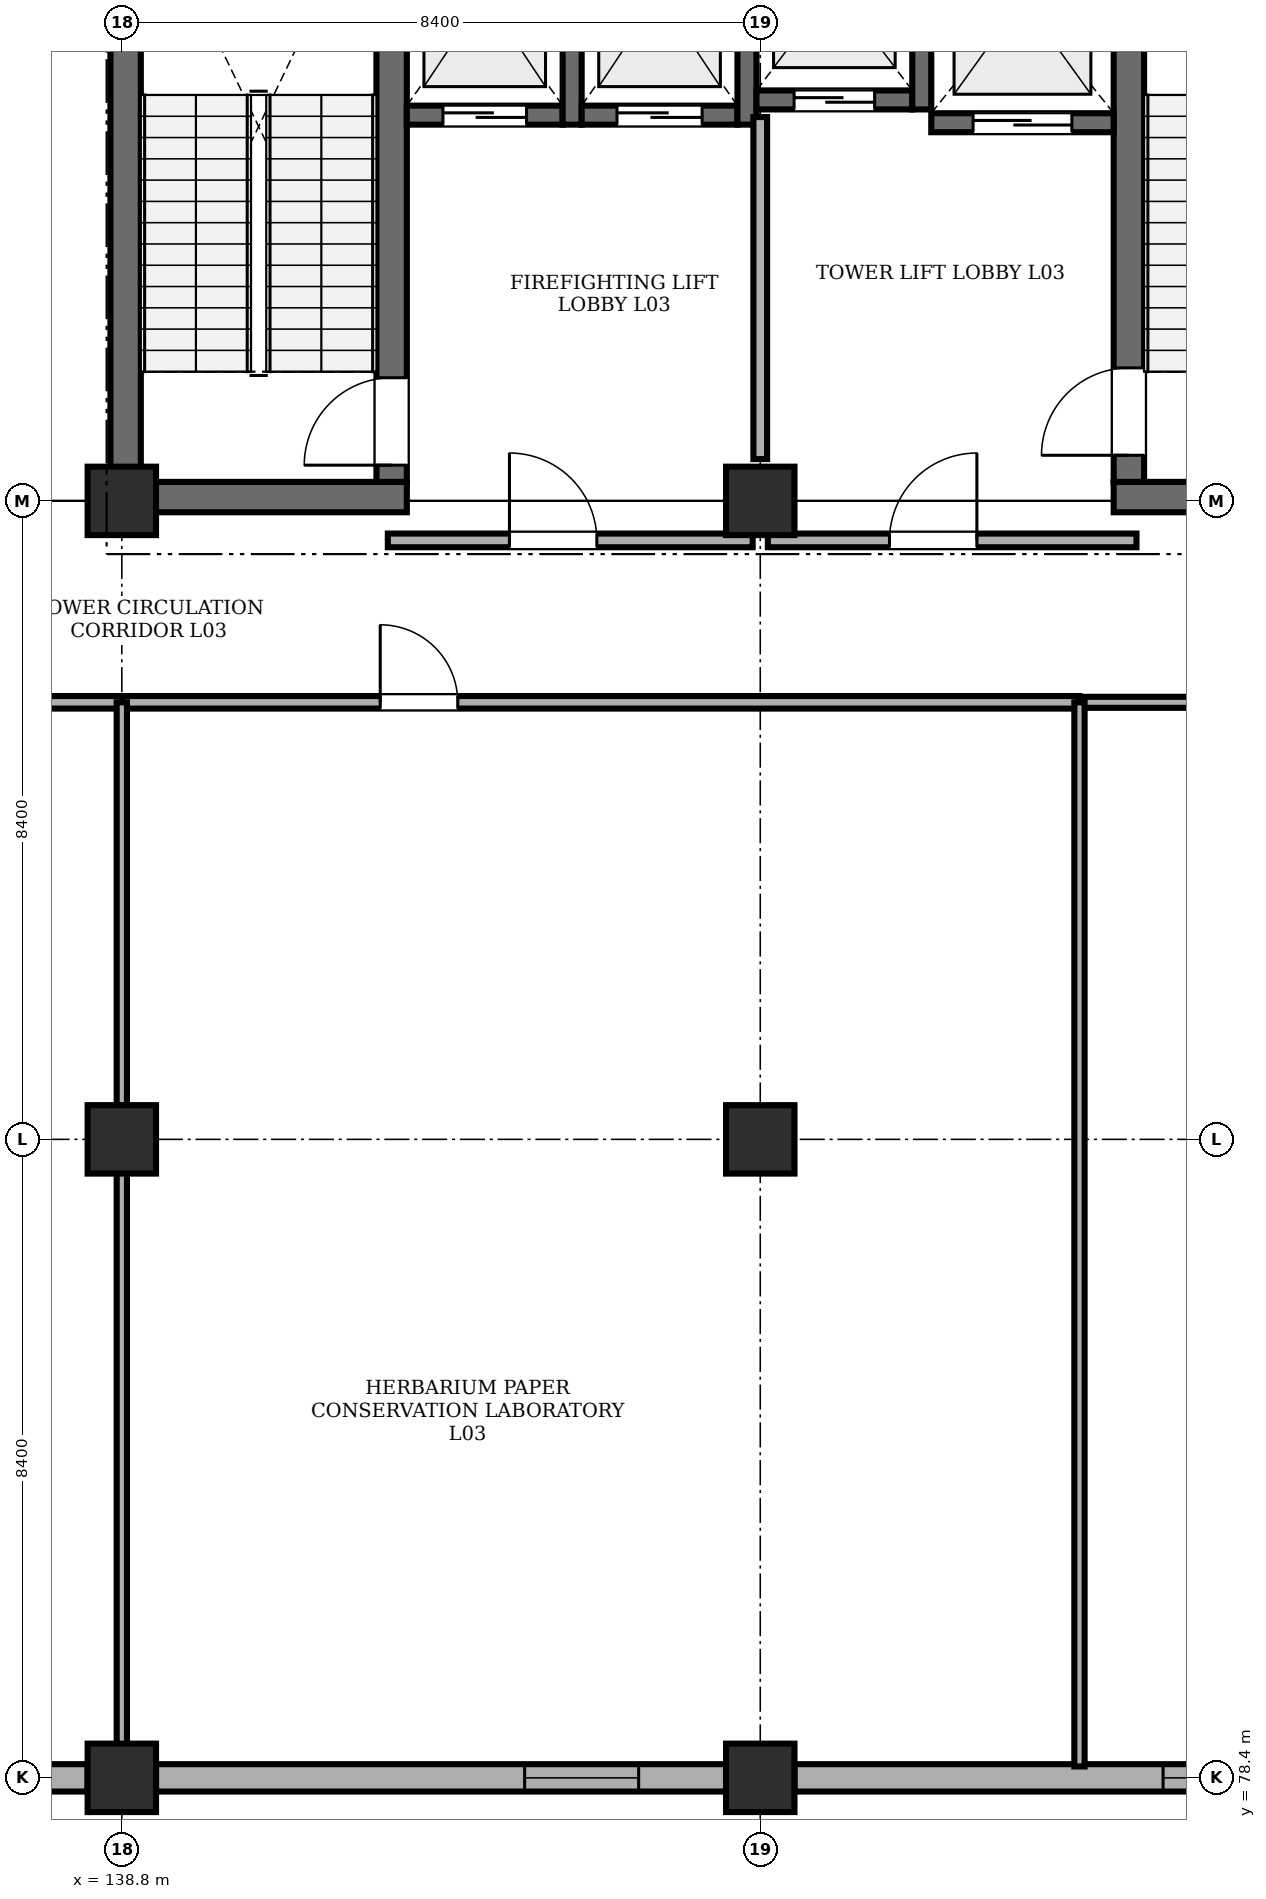
"""IFC4 building model, lengths in metres.
Left out: names, types, materials, properties, quantities, classifications, styles, units other than length and angle.
Written with IfcOpenShell. Run it as: python <this file> out.ifc"""

import sys

from ifc_helpers import new_model, si_unit, direction, frame, frame_2d, origin, origin_2d, place, context, subcontext, project, spatial, rectangle, extrude, element, fill, save


model = new_model("IFC4")
c1 = context("Model", 3, precision=1e-05, world=origin(), true_north=direction((0.0, 1.0)))
c2 = subcontext(c1, "Body", "Model", "MODEL_VIEW")
j1 = project(units=[si_unit("LENGTHUNIT", "METRE"), si_unit("PLANEANGLEUNIT", "RADIAN")], contexts=[c1])
p1 = place(None, origin())
s1 = spatial("IfcSite", under=j1, at=p1, CompositionType="ELEMENT")
p2 = place(p1, origin())
s2 = spatial("IfcBuilding", under=s1, at=p2, CompositionType="ELEMENT")
p3 = place(p2, frame((0.0, 0.0, 10.2)))
s3 = spatial("IfcBuildingStorey", under=s2, at=p3, CompositionType="ELEMENT", Elevation=10.2)
for number, where, z_axis, x_axis in (
    (1, (138.8, 78.4, 0.0), (0.0, 0.0, 1.0), (1.0, 0.0, 0.0)),
    (2, (138.8, 86.8, 0.0), (0.0, 0.0, 1.0), (1.0, 0.0, 0.0)),
    (3, (138.8, 95.2, 0.0), (0.0, 0.0, 1.0), (1.0, 0.0, 0.0)),
    (4, (147.2, 78.4, 0.0), (0.0, 0.0, 1.0), (1.0, 0.0, 0.0)),
    (5, (147.2, 86.8, 0.0), (0.0, 0.0, 1.0), (1.0, 0.0, 0.0)),
    (6, (147.2, 95.2, 0.0), (0.0, 0.0, 1.0), (1.0, 0.0, 0.0)),
):
    element("IfcColumn", number, at=place(p3, frame(where, z_axis=z_axis, x_axis=x_axis)), inside=s3, PredefinedType="COLUMN", context=c2, shape_type="SweptSolid", body=[
        extrude(rectangle(XDim=0.9, YDim=0.9, at=origin_2d()), origin(), (0.0, 0.0, 1.0), 4.26),
    ])
p4 = place(p3, frame((138.65, 95.25, 0.0), z_axis=(0.0, 0.0, 1.0), x_axis=(1.0, 0.0, 0.0)))
e7 = element("IfcWall", 7, at=p4, inside=s3, PredefinedType="SHEAR", context=c2, shape_type="SweptSolid", body=[
    extrude(rectangle(XDim=3.9, YDim=0.4, at=frame_2d((1.95, 0.0))), origin(), (0.0, 0.0, 1.0), 4.26),
])
p5 = place(p3, frame((138.85, 95.45, 0.0), z_axis=(0.0, 0.0, 1.0), x_axis=(0.0, 1.0, 0.0)))
e8 = element("IfcWall", 8, at=p5, inside=s3, PredefinedType="SHEAR", context=c2, shape_type="SweptSolid", body=[
    extrude(rectangle(XDim=7.9, YDim=0.4, at=frame_2d((3.95, 0.0))), origin(), (0.0, 0.0, 1.0), 4.26),
])
p6 = place(p3, frame((142.35, 95.45, 0.0), z_axis=(0.0, 0.0, 1.0), x_axis=(0.0, 1.0, 0.0)))
e9 = element("IfcWall", 9, at=p6, inside=s3, PredefinedType="SHEAR", context=c2, shape_type="SweptSolid", body=[
    extrude(rectangle(XDim=7.9, YDim=0.4, at=frame_2d((3.95, 0.0))), origin(), (0.0, 0.0, 1.0), 4.26),
])
p7 = place(p6, frame((0.22, 0.0, 0.0)))
e10 = element("IfcOpeningElement", 10, at=p7, cuts=e9, PredefinedType="OPENING", context=c2, shape_type="SweptSolid", body=[
    extrude(rectangle(XDim=1.15, YDim=2.15, at=frame_2d((0.575, 1.075))), frame((0.0, 0.21, 0.0), z_axis=(0.0, -1.0, 0.0), x_axis=(1.0, 0.0, 0.0)), (0.0, 0.0, 1.0), 0.42),
])
p8 = place(p3, frame((151.85, 95.25, 0.0), z_axis=(0.0, 0.0, 1.0), x_axis=(1.0, 0.0, 0.0)))
e11 = element("IfcWall", 11, at=p8, inside=s3, PredefinedType="SHEAR", context=c2, shape_type="SweptSolid", body=[
    extrude(rectangle(XDim=3.9, YDim=0.4, at=frame_2d((1.95, 0.0))), origin(), (0.0, 0.0, 1.0), 4.26),
])
p9 = place(p3, frame((152.05, 95.45, 0.0), z_axis=(0.0, 0.0, 1.0), x_axis=(0.0, 1.0, 0.0)))
e12 = element("IfcWall", 12, at=p9, inside=s3, PredefinedType="SHEAR", context=c2, shape_type="SweptSolid", body=[
    extrude(rectangle(XDim=7.9, YDim=0.4, at=frame_2d((3.95, 0.0))), origin(), (0.0, 0.0, 1.0), 4.26),
])
p10 = place(p9, frame((0.35, 0.0, 0.0)))
e13 = element("IfcOpeningElement", 13, at=p10, cuts=e12, PredefinedType="OPENING", context=c2, shape_type="SweptSolid", body=[
    extrude(rectangle(XDim=1.15, YDim=2.15, at=frame_2d((0.575, 1.075))), frame((0.0, 0.21, 0.0), z_axis=(0.0, -1.0, 0.0), x_axis=(1.0, 0.0, 0.0)), (0.0, 0.0, 1.0), 0.42),
])
p11 = place(p3, frame((142.55, 100.275, 0.0), z_axis=(0.0, 0.0, 1.0), x_axis=(1.0, 0.0, 0.0)))
e14 = element("IfcWall", 14, at=p11, inside=s3, PredefinedType="SHEAR", context=c2, shape_type="SweptSolid", body=[
    extrude(rectangle(XDim=2.05, YDim=0.25, at=frame_2d((1.025, 0.0))), origin(), (0.0, 0.0, 1.0), 4.26),
])
p12 = place(p11, frame((0.475, 0.0, 0.0)))
e15 = element("IfcOpeningElement", 15, at=p12, cuts=e14, PredefinedType="OPENING", context=c2, shape_type="SweptSolid", body=[
    extrude(rectangle(XDim=1.1, YDim=2.15, at=frame_2d((0.55, 1.075))), frame((0.0, 0.135, 0.0), z_axis=(0.0, -1.0, 0.0), x_axis=(1.0, 0.0, 0.0)), (0.0, 0.0, 1.0), 0.27),
])
p13 = place(p3, frame((144.725, 100.15, 0.0), z_axis=(0.0, 0.0, 1.0), x_axis=(0.0, 1.0, 0.0)))
e16 = element("IfcWall", 16, at=p13, inside=s3, PredefinedType="SHEAR", context=c2, shape_type="SweptSolid", body=[
    extrude(rectangle(XDim=3.4, YDim=0.25, at=frame_2d((1.7, 0.0))), origin(), (0.0, 0.0, 1.0), 4.26),
])
p14 = place(p3, frame((144.85, 100.275, 0.0), z_axis=(0.0, 0.0, 1.0), x_axis=(1.0, 0.0, 0.0)))
e17 = element("IfcWall", 17, at=p14, inside=s3, PredefinedType="SHEAR", context=c2, shape_type="SweptSolid", body=[
    extrude(rectangle(XDim=2.05, YDim=0.25, at=frame_2d((1.025, 0.0))), origin(), (0.0, 0.0, 1.0), 4.26),
])
p15 = place(p14, frame((0.465, 0.0, 0.0)))
e18 = element("IfcOpeningElement", 18, at=p15, cuts=e17, PredefinedType="OPENING", context=c2, shape_type="SweptSolid", body=[
    extrude(rectangle(XDim=1.12, YDim=2.15, at=frame_2d((0.56, 1.075))), frame((0.0, 0.135, 0.0), z_axis=(0.0, -1.0, 0.0), x_axis=(1.0, 0.0, 0.0)), (0.0, 0.0, 1.0), 0.27),
])
p16 = place(p3, frame((147.025, 100.15, 0.0), z_axis=(0.0, 0.0, 1.0), x_axis=(0.0, 1.0, 0.0)))
e19 = element("IfcWall", 19, at=p16, inside=s3, PredefinedType="SHEAR", context=c2, shape_type="SweptSolid", body=[
    extrude(rectangle(XDim=3.4, YDim=0.25, at=frame_2d((1.7, 0.0))), origin(), (0.0, 0.0, 1.0), 4.26),
])
p17 = place(p3, frame((147.15, 100.475, 0.0), z_axis=(0.0, 0.0, 1.0), x_axis=(1.0, 0.0, 0.0)))
e20 = element("IfcWall", 20, at=p17, inside=s3, PredefinedType="SHEAR", context=c2, shape_type="SweptSolid", body=[
    extrude(rectangle(XDim=2.05, YDim=0.25, at=frame_2d((1.025, 0.0))), origin(), (0.0, 0.0, 1.0), 4.26),
])
p18 = place(p17, frame((0.495, 0.0, 0.0)))
e21 = element("IfcOpeningElement", 21, at=p18, cuts=e20, PredefinedType="OPENING", context=c2, shape_type="SweptSolid", body=[
    extrude(rectangle(XDim=1.06, YDim=2.15, at=frame_2d((0.53, 1.075))), frame((0.0, 0.135, 0.0), z_axis=(0.0, -1.0, 0.0), x_axis=(1.0, 0.0, 0.0)), (0.0, 0.0, 1.0), 0.27),
])
p19 = place(p3, frame((149.325, 100.35, 0.0), z_axis=(0.0, 0.0, 1.0), x_axis=(0.0, 1.0, 0.0)))
e22 = element("IfcWall", 22, at=p19, inside=s3, PredefinedType="SHEAR", context=c2, shape_type="SweptSolid", body=[
    extrude(rectangle(XDim=3.2, YDim=0.25, at=frame_2d((1.6, 0.0))), origin(), (0.0, 0.0, 1.0), 4.26),
])
p20 = place(p3, frame((149.45, 100.175, 0.0), z_axis=(0.0, 0.0, 1.0), x_axis=(1.0, 0.0, 0.0)))
e23 = element("IfcWall", 23, at=p20, inside=s3, PredefinedType="SHEAR", context=c2, shape_type="SweptSolid", body=[
    extrude(rectangle(XDim=2.4, YDim=0.25, at=frame_2d((1.2, 0.0))), origin(), (0.0, 0.0, 1.0), 4.26),
])
p21 = place(p20, frame((0.55, 0.0, 0.0)))
e24 = element("IfcOpeningElement", 24, at=p21, cuts=e23, PredefinedType="OPENING", context=c2, shape_type="SweptSolid", body=[
    extrude(rectangle(XDim=1.3, YDim=2.25, at=frame_2d((0.65, 1.125))), frame((0.0, 0.135, 0.0), z_axis=(0.0, -1.0, 0.0), x_axis=(1.0, 0.0, 0.0)), (0.0, 0.0, 1.0), 0.27),
])
p22 = place(p3, frame((138.35, 78.4, 0.0), z_axis=(0.0, 0.0, 1.0), x_axis=(-1.0, 0.0, 0.0)))
e25 = element("IfcWall", 25, at=p22, inside=s3, PredefinedType="STANDARD", context=c2, shape_type="SweptSolid", body=[
    extrude(rectangle(XDim=7.5, YDim=0.36, at=frame_2d((3.75, 0.0))), origin(), (0.0, 0.0, 1.0), 3.16),
])
p23 = place(p22, frame((1.15, 0.0, 0.95)))
e26 = element("IfcOpeningElement", 26, at=p23, cuts=e25, PredefinedType="OPENING", context=c2, shape_type="SweptSolid", body=[
    extrude(rectangle(XDim=1.5, YDim=1.5, at=frame_2d((0.75, 0.75))), frame((0.0, 0.19, 0.0), z_axis=(0.0, -1.0, 0.0), x_axis=(1.0, 0.0, 0.0)), (0.0, 0.0, 1.0), 0.38),
])
p24 = place(p3, frame((146.75, 78.4, 0.0), z_axis=(0.0, 0.0, 1.0), x_axis=(-1.0, 0.0, 0.0)))
e27 = element("IfcWall", 27, at=p24, inside=s3, PredefinedType="STANDARD", context=c2, shape_type="SweptSolid", body=[
    extrude(rectangle(XDim=7.5, YDim=0.36, at=frame_2d((3.75, 0.0))), origin(), (0.0, 0.0, 1.0), 3.16),
])
p25 = place(p24, frame((1.15, 0.0, 0.95)))
e28 = element("IfcOpeningElement", 28, at=p25, cuts=e27, PredefinedType="OPENING", context=c2, shape_type="SweptSolid", body=[
    extrude(rectangle(XDim=1.5, YDim=1.5, at=frame_2d((0.75, 0.75))), frame((0.0, 0.19, 0.0), z_axis=(0.0, -1.0, 0.0), x_axis=(1.0, 0.0, 0.0)), (0.0, 0.0, 1.0), 0.38),
])
p26 = place(p3, frame((155.15, 78.4, 0.0), z_axis=(0.0, 0.0, 1.0), x_axis=(-1.0, 0.0, 0.0)))
e29 = element("IfcWall", 29, at=p26, inside=s3, PredefinedType="STANDARD", context=c2, shape_type="SweptSolid", body=[
    extrude(rectangle(XDim=7.5, YDim=0.36, at=frame_2d((3.75, 0.0))), origin(), (0.0, 0.0, 1.0), 3.16),
])
p27 = place(p26, frame((1.15, 0.0, 0.95)))
e30 = element("IfcOpeningElement", 30, at=p27, cuts=e29, PredefinedType="OPENING", context=c2, shape_type="SweptSolid", body=[
    extrude(rectangle(XDim=1.5, YDim=1.5, at=frame_2d((0.75, 0.75))), frame((0.0, 0.19, 0.0), z_axis=(0.0, -1.0, 0.0), x_axis=(1.0, 0.0, 0.0)), (0.0, 0.0, 1.0), 0.38),
])
p28 = place(p3, frame((142.3, 94.68, 0.0), z_axis=(0.0, 0.0, 1.0), x_axis=(1.0, 0.0, 0.0)))
e31 = element("IfcWall", 31, at=p28, inside=s3, PredefinedType="STANDARD", context=c2, shape_type="SweptSolid", body=[
    extrude(rectangle(XDim=4.8, YDim=0.18, at=frame_2d((2.4, 0.0))), origin(), (0.0, 0.0, 1.0), 4.26),
])
p29 = place(p28, frame((1.6, 0.0, 0.0)))
e32 = element("IfcOpeningElement", 32, at=p29, cuts=e31, PredefinedType="OPENING", context=c2, shape_type="SweptSolid", body=[
    extrude(rectangle(XDim=1.15, YDim=2.15, at=frame_2d((0.575, 1.075))), frame((0.0, 0.1, 0.0), z_axis=(0.0, -1.0, 0.0), x_axis=(1.0, 0.0, 0.0)), (0.0, 0.0, 1.0), 0.2),
])
p30 = place(p3, frame((147.3, 94.68, 0.0), z_axis=(0.0, 0.0, 1.0), x_axis=(1.0, 0.0, 0.0)))
e33 = element("IfcWall", 33, at=p30, inside=s3, PredefinedType="STANDARD", context=c2, shape_type="SweptSolid", body=[
    extrude(rectangle(XDim=4.85, YDim=0.18, at=frame_2d((2.425, 0.0))), origin(), (0.0, 0.0, 1.0), 4.26),
])
p31 = place(p30, frame((1.6, 0.0, 0.0)))
e34 = element("IfcOpeningElement", 34, at=p31, cuts=e33, PredefinedType="OPENING", context=c2, shape_type="SweptSolid", body=[
    extrude(rectangle(XDim=1.15, YDim=2.15, at=frame_2d((0.575, 1.075))), frame((0.0, 0.1, 0.0), z_axis=(0.0, -1.0, 0.0), x_axis=(1.0, 0.0, 0.0)), (0.0, 0.0, 1.0), 0.2),
])
p32 = place(p3, frame((147.2, 95.75, 0.0), z_axis=(0.0, 0.0, 1.0), x_axis=(0.0, 1.0, 0.0)))
e35 = element("IfcWall", 35, at=p32, inside=s3, PredefinedType="STANDARD", context=c2, shape_type="SweptSolid", body=[
    extrude(rectangle(XDim=4.5, YDim=0.18, at=frame_2d((2.25, 0.0))), origin(), (0.0, 0.0, 1.0), 3.51),
])
p33 = place(p3, frame((122.15, 92.55, 0.0), z_axis=(0.0, 0.0, 1.0), x_axis=(1.0, 0.0, 0.0)))
e36 = element("IfcWall", 36, at=p33, inside=s3, PredefinedType="PARTITIONING", context=c2, shape_type="SweptSolid", body=[
    extrude(rectangle(XDim=16.65, YDim=0.165, at=frame_2d((8.325, 0.0))), origin(), (0.0, 0.0, 1.0), 4.26),
])
p34 = place(p33, frame((3.75, 0.0, 0.0)))
e37 = element("IfcOpeningElement", 37, at=p34, cuts=e36, PredefinedType="OPENING", context=c2, shape_type="SweptSolid", body=[
    extrude(rectangle(XDim=1.7, YDim=2.2, at=frame_2d((0.85, 1.1))), frame((0.0, 0.093, 0.0), z_axis=(0.0, -1.0, 0.0), x_axis=(1.0, 0.0, 0.0)), (0.0, 0.0, 1.0), 0.185),
])
p35 = place(p3, frame((138.8, 92.55, 0.0), z_axis=(0.0, 0.0, 1.0), x_axis=(1.0, 0.0, 0.0)))
e38 = element("IfcWall", 38, at=p35, inside=s3, PredefinedType="PARTITIONING", context=c2, shape_type="SweptSolid", body=[
    extrude(rectangle(XDim=12.6, YDim=0.165, at=frame_2d((6.3, 0.0))), origin(), (0.0, 0.0, 1.0), 4.26),
])
p36 = place(p35, frame((3.4, 0.0, 0.0)))
e39 = element("IfcOpeningElement", 39, at=p36, cuts=e38, PredefinedType="OPENING", context=c2, shape_type="SweptSolid", body=[
    extrude(rectangle(XDim=1.02, YDim=2.15, at=frame_2d((0.51, 1.075))), frame((0.0, 0.093, 0.0), z_axis=(0.0, -1.0, 0.0), x_axis=(1.0, 0.0, 0.0)), (0.0, 0.0, 1.0), 0.185),
])
p37 = place(p3, frame((138.8, 78.55, 0.0), z_axis=(0.0, 0.0, 1.0), x_axis=(0.0, 1.0, 0.0)))
e40 = element("IfcWall", 40, at=p37, inside=s3, PredefinedType="PARTITIONING", context=c2, shape_type="SweptSolid", body=[
    extrude(rectangle(XDim=14.0, YDim=0.135, at=frame_2d((7.0, 0.0))), origin(), (0.0, 0.0, 1.0), 3.51),
])
p38 = place(p3, frame((151.4, 92.55, 0.0), z_axis=(0.0, 0.0, 1.0), x_axis=(1.0, 0.0, 0.0)))
e41 = element("IfcWall", 41, at=p38, inside=s3, PredefinedType="PARTITIONING", context=c2, shape_type="SweptSolid", body=[
    extrude(rectangle(XDim=11.95, YDim=0.145, at=frame_2d((5.975, 0.0))), origin(), (0.0, 0.0, 1.0), 4.26),
])
p39 = place(p38, frame((6.8, 0.0, 0.0)))
e42 = element("IfcOpeningElement", 42, at=p39, cuts=e41, PredefinedType="OPENING", context=c2, shape_type="SweptSolid", body=[
    extrude(rectangle(XDim=1.08, YDim=2.15, at=frame_2d((0.54, 1.075))), frame((0.0, 0.083, 0.0), z_axis=(0.0, -1.0, 0.0), x_axis=(1.0, 0.0, 0.0)), (0.0, 0.0, 1.0), 0.165),
])
p40 = place(p3, frame((151.4, 78.55, 0.0), z_axis=(0.0, 0.0, 1.0), x_axis=(0.0, 1.0, 0.0)))
e43 = element("IfcWall", 43, at=p40, inside=s3, PredefinedType="PARTITIONING", context=c2, shape_type="SweptSolid", body=[
    extrude(rectangle(XDim=14.0, YDim=0.135, at=frame_2d((7.0, 0.0))), origin(), (0.0, 0.0, 1.0), 3.71),
])
p41 = place(p25, origin())
e44 = element("IfcWindow", 44, at=p41, inside=s3, PartitioningType="DOUBLE_PANEL_VERTICAL", PredefinedType="WINDOW", context=c2, shape_type="SweptSolid", body=[
    extrude(rectangle(XDim=1.5, YDim=1.5, at=frame_2d((0.75, 0.75))), frame((0.0, 0.03, 0.0), z_axis=(0.0, -1.0, 0.0), x_axis=(1.0, 0.0, 0.0)), (0.0, 0.0, 1.0), 0.06),
])
fill(e28, e44)
p42 = place(p27, origin())
e45 = element("IfcWindow", 45, at=p42, inside=s3, PartitioningType="DOUBLE_PANEL_VERTICAL", PredefinedType="WINDOW", context=c2, shape_type="SweptSolid", body=[
    extrude(rectangle(XDim=1.5, YDim=1.5, at=frame_2d((0.75, 0.75))), frame((0.0, 0.03, 0.0), z_axis=(0.0, -1.0, 0.0), x_axis=(1.0, 0.0, 0.0)), (0.0, 0.0, 1.0), 0.06),
])
fill(e30, e45)
p43 = place(p29, origin())
e46 = element("IfcDoor", 46, at=p43, inside=s3, OperationType="SINGLE_SWING_LEFT", PredefinedType="DOOR", context=c2, shape_type="SweptSolid", body=[
    extrude(rectangle(XDim=1.15, YDim=2.15, at=frame_2d((0.575, 1.075))), frame((0.0, 0.025, 0.0), z_axis=(0.0, -1.0, 0.0), x_axis=(1.0, 0.0, 0.0)), (0.0, 0.0, 1.0), 0.05),
])
fill(e32, e46)
p44 = place(p31, origin())
e47 = element("IfcDoor", 47, at=p44, inside=s3, OperationType="SINGLE_SWING_RIGHT", PredefinedType="DOOR", context=c2, shape_type="SweptSolid", body=[
    extrude(rectangle(XDim=1.15, YDim=2.15, at=frame_2d((0.575, 1.075))), frame((0.0, 0.025, 0.0), z_axis=(0.0, -1.0, 0.0), x_axis=(1.0, 0.0, 0.0)), (0.0, 0.0, 1.0), 0.05),
])
fill(e34, e47)
p45 = place(p36, origin())
e48 = element("IfcDoor", 48, at=p45, inside=s3, OperationType="SINGLE_SWING_LEFT", PredefinedType="DOOR", context=c2, shape_type="SweptSolid", body=[
    extrude(rectangle(XDim=1.02, YDim=2.15, at=frame_2d((0.51, 1.075))), frame((0.0, 0.025, 0.0), z_axis=(0.0, -1.0, 0.0), x_axis=(1.0, 0.0, 0.0)), (0.0, 0.0, 1.0), 0.05),
])
fill(e39, e48)
p46 = place(p7, origin())
e49 = element("IfcDoor", 49, at=p46, inside=s3, OperationType="SINGLE_SWING_LEFT", PredefinedType="DOOR", context=c2, shape_type="SweptSolid", body=[
    extrude(rectangle(XDim=1.15, YDim=2.15, at=frame_2d((0.575, 1.075))), frame((0.0, 0.025, 0.0), z_axis=(0.0, -1.0, 0.0), x_axis=(1.0, 0.0, 0.0)), (0.0, 0.0, 1.0), 0.05),
])
fill(e10, e49)
p47 = place(p10, origin())
e50 = element("IfcDoor", 50, at=p47, inside=s3, OperationType="SINGLE_SWING_LEFT", PredefinedType="DOOR", context=c2, shape_type="SweptSolid", body=[
    extrude(rectangle(XDim=1.15, YDim=2.15, at=frame_2d((0.575, 1.075))), frame((0.0, 0.025, 0.0), z_axis=(0.0, -1.0, 0.0), x_axis=(1.0, 0.0, 0.0)), (0.0, 0.0, 1.0), 0.05),
])
fill(e13, e50)
p48 = place(p12, origin())
e51 = element("IfcDoor", 51, at=p48, inside=s3, OperationType="SLIDING_TO_LEFT", PredefinedType="DOOR", context=c2, shape_type="SweptSolid", body=[
    extrude(rectangle(XDim=1.1, YDim=2.15, at=frame_2d((0.55, 1.075))), frame((0.0, 0.025, 0.0), z_axis=(0.0, -1.0, 0.0), x_axis=(1.0, 0.0, 0.0)), (0.0, 0.0, 1.0), 0.05),
])
fill(e15, e51)
p49 = place(p15, origin())
e52 = element("IfcDoor", 52, at=p49, inside=s3, OperationType="SLIDING_TO_LEFT", PredefinedType="DOOR", context=c2, shape_type="SweptSolid", body=[
    extrude(rectangle(XDim=1.12, YDim=2.15, at=frame_2d((0.56, 1.075))), frame((0.0, 0.025, 0.0), z_axis=(0.0, -1.0, 0.0), x_axis=(1.0, 0.0, 0.0)), (0.0, 0.0, 1.0), 0.05),
])
fill(e18, e52)
p50 = place(p18, origin())
e53 = element("IfcDoor", 53, at=p50, inside=s3, OperationType="SLIDING_TO_LEFT", PredefinedType="DOOR", context=c2, shape_type="SweptSolid", body=[
    extrude(rectangle(XDim=1.06, YDim=2.15, at=frame_2d((0.53, 1.075))), frame((0.0, 0.025, 0.0), z_axis=(0.0, -1.0, 0.0), x_axis=(1.0, 0.0, 0.0)), (0.0, 0.0, 1.0), 0.05),
])
fill(e21, e53)
p51 = place(p21, origin())
e54 = element("IfcDoor", 54, at=p51, inside=s3, OperationType="SLIDING_TO_LEFT", PredefinedType="DOOR", context=c2, shape_type="SweptSolid", body=[
    extrude(rectangle(XDim=1.3, YDim=2.25, at=frame_2d((0.65, 1.125))), frame((0.0, 0.025, 0.0), z_axis=(0.0, -1.0, 0.0), x_axis=(1.0, 0.0, 0.0)), (0.0, 0.0, 1.0), 0.05),
])
fill(e24, e54)
save(model, sys.argv[1])
